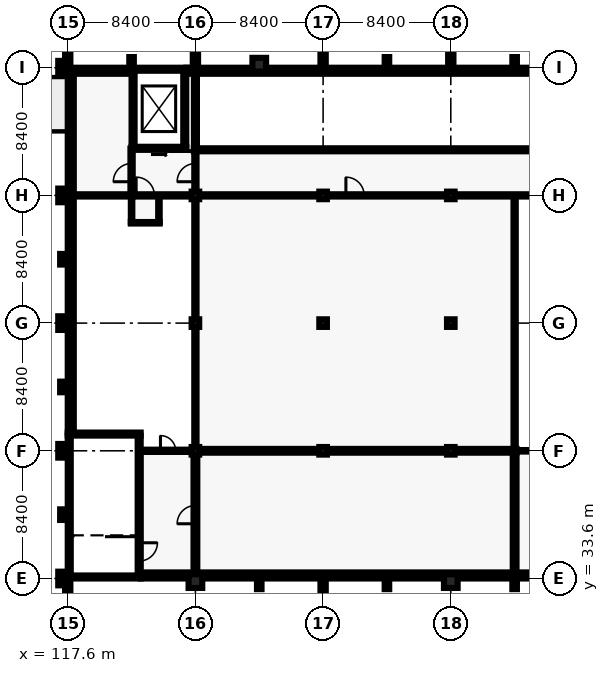
"""IFC4 building model, lengths in metres.
Left out: names, types, materials, properties, quantities, classifications, styles, units other than length and angle.
Written with IfcOpenShell. Run it as: python <this file> out.ifc"""

import sys

from ifc_helpers import new_model, si_unit, direction, frame, frame_2d, origin, origin_2d, place, context, subcontext, project, spatial, rectangle, extrude, element, fill, save


model = new_model("IFC4")
c1 = context("Model", 3, precision=1e-05, world=origin(), true_north=direction((0.0, 1.0)))
c2 = subcontext(c1, "Body", "Model", "MODEL_VIEW")
j1 = project(units=[si_unit("LENGTHUNIT", "METRE"), si_unit("PLANEANGLEUNIT", "RADIAN")], contexts=[c1])
p1 = place(None, origin())
s1 = spatial("IfcSite", under=j1, at=p1, CompositionType="ELEMENT")
p2 = place(p1, origin())
s2 = spatial("IfcBuilding", under=s1, at=p2, CompositionType="ELEMENT")
p3 = place(p2, frame((0.0, 0.0, 10.2)))
s3 = spatial("IfcBuildingStorey", under=s2, at=p3, CompositionType="ELEMENT", Elevation=10.2)
for number, where, z_axis, x_axis in (
    (1, (122.4, 33.7, 0.0), (0.0, 0.0, 1.0), (-1.0, 0.0, 0.0)),
    (2, (117.6, 43.1, 0.0), (0.0, 0.0, 1.0), (1.0, 0.0, 0.0)),
):
    element("IfcWall", number, at=place(p3, frame(where, z_axis=z_axis, x_axis=x_axis)), inside=s3, PredefinedType="SHEAR", context=c2, shape_type="SweptSolid", body=[
        extrude(rectangle(XDim=4.8, YDim=0.2, at=frame_2d((2.4, 0.0))), origin(), (0.0, 0.0, 1.0), 4.8),
    ])
p4 = place(p3, frame((117.7, 33.8, 0.0), z_axis=(0.0, 0.0, 1.0), x_axis=(0.0, 1.0, 0.0)))
e3 = element("IfcWall", 3, at=p4, inside=s3, PredefinedType="SHEAR", context=c2, shape_type="SweptSolid", body=[
    extrude(rectangle(XDim=9.2, YDim=0.2, at=frame_2d((4.6, 0.0))), origin(), (0.0, 0.0, 1.0), 4.8),
])
p5 = place(p3, frame((122.3, 43.0, 0.0), z_axis=(0.0, 0.0, 1.0), x_axis=(0.0, -1.0, 0.0)))
e4 = element("IfcWall", 4, at=p5, inside=s3, PredefinedType="SHEAR", context=c2, shape_type="SweptSolid", body=[
    extrude(rectangle(XDim=9.2, YDim=0.2, at=frame_2d((4.6, 0.0))), origin(), (0.0, 0.0, 1.0), 4.8),
])
p6 = place(p5, frame((7.05, 0.0, 0.0)))
e5 = element("IfcOpeningElement", 5, at=p6, cuts=e4, PredefinedType="OPENING", context=c2, shape_type="SweptSolid", body=[
    extrude(rectangle(XDim=1.2, YDim=2.1, at=frame_2d((0.6, 1.05))), frame((0.0, 0.11, 0.0), z_axis=(0.0, -1.0, 0.0), x_axis=(1.0, 0.0, 0.0)), (0.0, 0.0, 1.0), 0.22),
])
p7 = place(p3, frame((125.4, 61.9, 0.0), z_axis=(0.0, 0.0, 1.0), x_axis=(-1.0, 0.0, 0.0)))
e6 = element("IfcWall", 6, at=p7, inside=s3, PredefinedType="SHEAR", context=c2, shape_type="SweptSolid", body=[
    extrude(rectangle(XDim=3.6, YDim=0.2, at=frame_2d((1.8, 0.0))), origin(), (0.0, 0.0, 1.0), 4.8),
])
p8 = place(p7, frame((1.05, 0.0, 0.0)))
e7 = element("IfcOpeningElement", 7, at=p8, cuts=e6, PredefinedType="OPENING", context=c2, shape_type="SweptSolid", body=[
    extrude(rectangle(XDim=1.5, YDim=2.3, at=frame_2d((0.75, 1.15))), frame((0.0, 0.11, 0.0), z_axis=(0.0, -1.0, 0.0), x_axis=(1.0, 0.0, 0.0)), (0.0, 0.0, 1.0), 0.22),
])
p9 = place(p3, frame((121.8, 67.1, 0.0), z_axis=(0.0, 0.0, 1.0), x_axis=(1.0, 0.0, 0.0)))
e8 = element("IfcWall", 8, at=p9, inside=s3, PredefinedType="SHEAR", context=c2, shape_type="SweptSolid", body=[
    extrude(rectangle(XDim=3.6, YDim=0.2, at=frame_2d((1.8, 0.0))), origin(), (0.0, 0.0, 1.0), 4.8),
])
for number, where, z_axis, x_axis in (
    (9, (121.9, 62.0, 0.0), (0.0, 0.0, 1.0), (0.0, 1.0, 0.0)),
    (10, (125.3, 67.0, 0.0), (0.0, 0.0, 1.0), (0.0, -1.0, 0.0)),
):
    element("IfcWall", number, at=place(p3, frame(where, z_axis=z_axis, x_axis=x_axis)), inside=s3, PredefinedType="SHEAR", context=c2, shape_type="SweptSolid", body=[
        extrude(rectangle(XDim=5.0, YDim=0.2, at=frame_2d((2.5, 0.0))), origin(), (0.0, 0.0, 1.0), 4.8),
    ])
p10 = place(p3, frame((163.2, 33.8, 0.0), z_axis=(0.0, 0.0, 1.0), x_axis=(-1.0, 0.0, 0.0)))
e11 = element("IfcWall", 11, at=p10, inside=s3, PredefinedType="SHEAR", context=c2, shape_type="SweptSolid", body=[
    extrude(rectangle(XDim=40.8, YDim=0.4, at=frame_2d((20.4, 0.0))), origin(), (0.0, 0.0, 1.0), 4.8),
])
p11 = place(p3, frame((117.6, 67.0, 0.0), z_axis=(0.0, 0.0, 1.0), x_axis=(1.0, 0.0, 0.0)))
e12 = element("IfcWall", 12, at=p11, inside=s3, PredefinedType="SHEAR", context=c2, shape_type="SweptSolid", body=[
    extrude(rectangle(XDim=4.2, YDim=0.4, at=frame_2d((2.1, 0.0))), origin(), (0.0, 0.0, 1.0), 4.8),
])
p12 = place(p3, frame((125.4, 67.0, 0.0), z_axis=(0.0, 0.0, 1.0), x_axis=(1.0, 0.0, 0.0)))
e13 = element("IfcWall", 13, at=p12, inside=s3, PredefinedType="SHEAR", context=c2, shape_type="SweptSolid", body=[
    extrude(rectangle(XDim=37.8, YDim=0.4, at=frame_2d((18.9, 0.0))), origin(), (0.0, 0.0, 1.0), 4.8),
])
p13 = place(p3, frame((117.8, 43.2, 0.0), z_axis=(0.0, 0.0, 1.0), x_axis=(0.0, 1.0, 0.0)))
e14 = element("IfcWall", 14, at=p13, inside=s3, PredefinedType="SHEAR", context=c2, shape_type="SweptSolid", body=[
    extrude(rectangle(XDim=23.6, YDim=0.4, at=frame_2d((11.8, 0.0))), origin(), (0.0, 0.0, 1.0), 4.8),
])
for number, where, z_axis, x_axis in (
    (15, (126.0, 42.0, 0.0), (0.0, 0.0, 1.0), (1.0, 0.0, 0.0)),
    (16, (126.0, 50.4, 0.0), (0.0, 0.0, 1.0), (1.0, 0.0, 0.0)),
    (17, (126.0, 58.8, 0.0), (0.0, 0.0, 1.0), (1.0, 0.0, 0.0)),
    (18, (134.4, 42.0, 0.0), (0.0, 0.0, 1.0), (1.0, 0.0, 0.0)),
    (19, (134.4, 50.4, 0.0), (0.0, 0.0, 1.0), (1.0, 0.0, 0.0)),
    (20, (134.4, 58.8, 0.0), (0.0, 0.0, 1.0), (1.0, 0.0, 0.0)),
    (21, (142.8, 42.0, 0.0), (0.0, 0.0, 1.0), (1.0, 0.0, 0.0)),
    (22, (142.8, 50.4, 0.0), (0.0, 0.0, 1.0), (1.0, 0.0, 0.0)),
    (23, (142.8, 58.8, 0.0), (0.0, 0.0, 1.0), (1.0, 0.0, 0.0)),
):
    element("IfcColumn", number, at=place(p3, frame(where, z_axis=z_axis, x_axis=x_axis)), inside=s3, PredefinedType="COLUMN", context=c2, shape_type="SweptSolid", body=[
        extrude(rectangle(XDim=0.5, YDim=0.5, at=origin_2d()), origin(), (0.0, 0.0, 1.0), 4.8),
    ])
for number, where, z_axis, x_axis in (
    (24, (126.0, 33.427, 3.8), (0.0, 0.0, 1.0), (1.0, 0.0, 0.0)),
    (25, (142.8, 33.427, 3.8), (0.0, 0.0, 1.0), (1.0, 0.0, 0.0)),
    (26, (130.2, 67.4, 3.8), (0.0, 0.0, 1.0), (1.0, 0.0, 0.0)),
):
    element("IfcColumn", number, at=place(p3, frame(where, z_axis=z_axis, x_axis=x_axis)), inside=s3, PredefinedType="COLUMN", context=c2, shape_type="SweptSolid", body=[
        extrude(rectangle(XDim=0.9, YDim=0.9, at=origin_2d()), origin(), (0.0, 0.0, 1.0), 1.0),
    ])
p14 = place(p3, frame((117.6, 32.975, 0.0), z_axis=(0.0, 0.0, 1.0), x_axis=(1.0, 0.0, 0.0)))
e27 = element("IfcColumn", 27, at=p14, inside=s3, PredefinedType="PILASTER", context=c2, shape_type="SweptSolid", body=[
    extrude(rectangle(XDim=0.35, YDim=0.9, at=origin_2d()), origin(), (0.0, 0.0, 1.0), 4.8),
])
p15 = place(p3, frame((130.2, 33.25, 0.0), z_axis=(0.0, 0.0, 1.0), x_axis=(1.0, 0.0, 0.0)))
e28 = element("IfcColumn", 28, at=p15, inside=s3, PredefinedType="PILASTER", context=c2, shape_type="SweptSolid", body=[
    extrude(rectangle(XDim=0.3, YDim=0.7, at=origin_2d()), origin(), (0.0, 0.0, 1.0), 4.8),
])
p16 = place(p3, frame((134.4, 33.15, 0.0), z_axis=(0.0, 0.0, 1.0), x_axis=(1.0, 0.0, 0.0)))
e29 = element("IfcColumn", 29, at=p16, inside=s3, PredefinedType="PILASTER", context=c2, shape_type="SweptSolid", body=[
    extrude(rectangle(XDim=0.35, YDim=0.9, at=origin_2d()), origin(), (0.0, 0.0, 1.0), 4.8),
])
for number, where, z_axis, x_axis in (
    (30, (138.6, 33.25, 0.0), (0.0, 0.0, 1.0), (1.0, 0.0, 0.0)),
    (31, (147.0, 33.25, 0.0), (0.0, 0.0, 1.0), (1.0, 0.0, 0.0)),
):
    element("IfcColumn", number, at=place(p3, frame(where, z_axis=z_axis, x_axis=x_axis)), inside=s3, PredefinedType="PILASTER", context=c2, shape_type="SweptSolid", body=[
        extrude(rectangle(XDim=0.3, YDim=0.7, at=origin_2d()), origin(), (0.0, 0.0, 1.0), 4.8),
    ])
p17 = place(p3, frame((117.6, 67.825, 0.0), z_axis=(0.0, 0.0, 1.0), x_axis=(1.0, 0.0, 0.0)))
e32 = element("IfcColumn", 32, at=p17, inside=s3, PredefinedType="PILASTER", context=c2, shape_type="SweptSolid", body=[
    extrude(rectangle(XDim=0.35, YDim=0.9, at=origin_2d()), origin(), (0.0, 0.0, 1.0), 4.8),
])
p18 = place(p3, frame((121.8, 67.55, 0.0), z_axis=(0.0, 0.0, 1.0), x_axis=(1.0, 0.0, 0.0)))
e33 = element("IfcColumn", 33, at=p18, inside=s3, PredefinedType="PILASTER", context=c2, shape_type="SweptSolid", body=[
    extrude(rectangle(XDim=0.3, YDim=0.7, at=origin_2d()), origin(), (0.0, 0.0, 1.0), 4.8),
])
for number, where, z_axis, x_axis in (
    (34, (126.0, 67.65, 0.0), (0.0, 0.0, 1.0), (1.0, 0.0, 0.0)),
    (35, (134.4, 67.65, 0.0), (0.0, 0.0, 1.0), (1.0, 0.0, 0.0)),
):
    element("IfcColumn", number, at=place(p3, frame(where, z_axis=z_axis, x_axis=x_axis)), inside=s3, PredefinedType="PILASTER", context=c2, shape_type="SweptSolid", body=[
        extrude(rectangle(XDim=0.35, YDim=0.9, at=origin_2d()), origin(), (0.0, 0.0, 1.0), 4.8),
    ])
p19 = place(p3, frame((138.6, 67.55, 0.0), z_axis=(0.0, 0.0, 1.0), x_axis=(1.0, 0.0, 0.0)))
e36 = element("IfcColumn", 36, at=p19, inside=s3, PredefinedType="PILASTER", context=c2, shape_type="SweptSolid", body=[
    extrude(rectangle(XDim=0.3, YDim=0.7, at=origin_2d()), origin(), (0.0, 0.0, 1.0), 4.8),
])
p20 = place(p3, frame((142.8, 67.65, 0.0), z_axis=(0.0, 0.0, 1.0), x_axis=(1.0, 0.0, 0.0)))
e37 = element("IfcColumn", 37, at=p20, inside=s3, PredefinedType="PILASTER", context=c2, shape_type="SweptSolid", body=[
    extrude(rectangle(XDim=0.35, YDim=0.9, at=origin_2d()), origin(), (0.0, 0.0, 1.0), 4.8),
])
p21 = place(p3, frame((147.0, 67.55, 0.0), z_axis=(0.0, 0.0, 1.0), x_axis=(1.0, 0.0, 0.0)))
e38 = element("IfcColumn", 38, at=p21, inside=s3, PredefinedType="PILASTER", context=c2, shape_type="SweptSolid", body=[
    extrude(rectangle(XDim=0.3, YDim=0.7, at=origin_2d()), origin(), (0.0, 0.0, 1.0), 4.8),
])
p22 = place(p3, frame((117.15, 33.6, 0.0), z_axis=(0.0, 0.0, 1.0), x_axis=(0.0, 1.0, 0.0)))
e39 = element("IfcColumn", 39, at=p22, inside=s3, PredefinedType="PILASTER", context=c2, shape_type="SweptSolid", body=[
    extrude(rectangle(XDim=0.35, YDim=0.9, at=origin_2d()), origin(), (0.0, 0.0, 1.0), 4.8),
])
p23 = place(p3, frame((117.25, 37.8, 0.0), z_axis=(0.0, 0.0, 1.0), x_axis=(0.0, 1.0, 0.0)))
e40 = element("IfcColumn", 40, at=p23, inside=s3, PredefinedType="PILASTER", context=c2, shape_type="SweptSolid", body=[
    extrude(rectangle(XDim=0.3, YDim=0.7, at=origin_2d()), origin(), (0.0, 0.0, 1.0), 4.8),
])
p24 = place(p3, frame((117.15, 42.0, 0.0), z_axis=(0.0, 0.0, 1.0), x_axis=(0.0, 1.0, 0.0)))
e41 = element("IfcColumn", 41, at=p24, inside=s3, PredefinedType="PILASTER", context=c2, shape_type="SweptSolid", body=[
    extrude(rectangle(XDim=0.35, YDim=0.9, at=origin_2d()), origin(), (0.0, 0.0, 1.0), 4.8),
])
p25 = place(p3, frame((117.25, 46.2, 0.0), z_axis=(0.0, 0.0, 1.0), x_axis=(0.0, 1.0, 0.0)))
e42 = element("IfcColumn", 42, at=p25, inside=s3, PredefinedType="PILASTER", context=c2, shape_type="SweptSolid", body=[
    extrude(rectangle(XDim=0.3, YDim=0.7, at=origin_2d()), origin(), (0.0, 0.0, 1.0), 4.8),
])
p26 = place(p3, frame((117.15, 50.4, 0.0), z_axis=(0.0, 0.0, 1.0), x_axis=(0.0, 1.0, 0.0)))
e43 = element("IfcColumn", 43, at=p26, inside=s3, PredefinedType="PILASTER", context=c2, shape_type="SweptSolid", body=[
    extrude(rectangle(XDim=0.35, YDim=0.9, at=origin_2d()), origin(), (0.0, 0.0, 1.0), 4.8),
])
p27 = place(p3, frame((117.25, 54.6, 0.0), z_axis=(0.0, 0.0, 1.0), x_axis=(0.0, 1.0, 0.0)))
e44 = element("IfcColumn", 44, at=p27, inside=s3, PredefinedType="PILASTER", context=c2, shape_type="SweptSolid", body=[
    extrude(rectangle(XDim=0.3, YDim=0.7, at=origin_2d()), origin(), (0.0, 0.0, 1.0), 4.8),
])
for number, where, z_axis, x_axis in (
    (45, (117.15, 58.8, 0.0), (0.0, 0.0, 1.0), (0.0, 1.0, 0.0)),
    (46, (117.15, 67.2, 0.0), (0.0, 0.0, 1.0), (0.0, 1.0, 0.0)),
):
    element("IfcColumn", number, at=place(p3, frame(where, z_axis=z_axis, x_axis=x_axis)), inside=s3, PredefinedType="PILASTER", context=c2, shape_type="SweptSolid", body=[
        extrude(rectangle(XDim=0.35, YDim=0.9, at=origin_2d()), origin(), (0.0, 0.0, 1.0), 4.8),
    ])
p28 = place(p3, frame((125.875, 42.0, 0.0), z_axis=(0.0, 0.0, 1.0), x_axis=(1.0, 0.0, 0.0)))
e47 = element("IfcWall", 47, at=p28, inside=s3, PredefinedType="PARTITIONING", context=c2, shape_type="SweptSolid", body=[
    extrude(rectangle(XDim=21.25, YDim=0.25, at=frame_2d((10.625, 0.0))), origin(), (0.0, 0.0, 1.0), 4.5),
])
p29 = place(p3, frame((126.0, 34.0, 0.0), z_axis=(0.0, 0.0, 1.0), x_axis=(0.0, 1.0, 0.0)))
e48 = element("IfcWall", 48, at=p29, inside=s3, PredefinedType="PARTITIONING", context=c2, shape_type="SweptSolid", body=[
    extrude(rectangle(XDim=7.875, YDim=0.25, at=frame_2d((3.938, 0.0))), origin(), (0.0, 0.0, 1.0), 4.5),
])
p30 = place(p29, frame((3.2, 0.0, 0.0)))
e49 = element("IfcOpeningElement", 49, at=p30, cuts=e48, PredefinedType="OPENING", context=c2, shape_type="SweptSolid", body=[
    extrude(rectangle(XDim=1.2, YDim=2.1, at=frame_2d((0.6, 1.05))), frame((0.0, 0.135, 0.0), z_axis=(0.0, -1.0, 0.0), x_axis=(1.0, 0.0, 0.0)), (0.0, 0.0, 1.0), 0.27),
])
p31 = place(p3, frame((147.0, 34.0, 0.0), z_axis=(0.0, 0.0, 1.0), x_axis=(0.0, 1.0, 0.0)))
e50 = element("IfcWall", 50, at=p31, inside=s3, PredefinedType="PARTITIONING", context=c2, shape_type="SweptSolid", body=[
    extrude(rectangle(XDim=7.875, YDim=0.25, at=frame_2d((3.938, 0.0))), origin(), (0.0, 0.0, 1.0), 4.5),
])
p32 = place(p3, frame((125.9, 61.8, 0.0), z_axis=(0.0, 0.0, 1.0), x_axis=(1.0, 0.0, 0.0)))
e51 = element("IfcWall", 51, at=p32, inside=s3, PredefinedType="SOLIDWALL", context=c2, shape_type="SweptSolid", body=[
    extrude(rectangle(XDim=34.4, YDim=0.2, at=frame_2d((17.2, 0.0))), origin(), (0.0, 0.0, 1.0), 4.5),
])
p33 = place(p3, frame((126.0, 61.9, 0.0), z_axis=(0.0, 0.0, 1.0), x_axis=(0.0, 1.0, 0.0)))
e52 = element("IfcWall", 52, at=p33, inside=s3, PredefinedType="SHEAR", context=c2, shape_type="SweptSolid", body=[
    extrude(rectangle(XDim=4.9, YDim=0.2, at=frame_2d((2.45, 0.0))), origin(), (0.0, 0.0, 1.0), 4.5),
])
p34 = place(p3, frame((122.4, 42.0, 0.0), z_axis=(0.0, 0.0, 1.0), x_axis=(1.0, 0.0, 0.0)))
e53 = element("IfcWall", 53, at=p34, inside=s3, PredefinedType="PARTITIONING", context=c2, shape_type="SweptSolid", body=[
    extrude(rectangle(XDim=3.475, YDim=0.15, at=frame_2d((1.738, 0.0))), origin(), (0.0, 0.0, 1.0), 4.5),
])
p35 = place(p34, frame((1.3, 0.0, 0.0)))
e54 = element("IfcOpeningElement", 54, at=p35, cuts=e53, PredefinedType="OPENING", context=c2, shape_type="SweptSolid", body=[
    extrude(rectangle(XDim=1.0, YDim=2.1, at=frame_2d((0.5, 1.05))), frame((0.0, 0.085, 0.0), z_axis=(0.0, -1.0, 0.0), x_axis=(1.0, 0.0, 0.0)), (0.0, 0.0, 1.0), 0.17),
])
p36 = place(p3, frame((118.0, 58.8, 0.0), z_axis=(0.0, 0.0, 1.0), x_axis=(1.0, 0.0, 0.0)))
e55 = element("IfcWall", 55, at=p36, inside=s3, PredefinedType="PARTITIONING", context=c2, shape_type="SweptSolid", body=[
    extrude(rectangle(XDim=3.875, YDim=0.15, at=frame_2d((1.938, 0.0))), origin(), (0.0, 0.0, 1.0), 4.5),
])
p37 = place(p3, frame((125.925, 58.8, 0.0), z_axis=(0.0, 0.0, 1.0), x_axis=(1.0, 0.0, 0.0)))
e56 = element("IfcWall", 56, at=p37, inside=s3, PredefinedType="PARTITIONING", context=c2, shape_type="SweptSolid", body=[
    extrude(rectangle(XDim=34.35, YDim=0.15, at=frame_2d((17.175, 0.0))), origin(), (0.0, 0.0, 1.0), 4.5),
])
p38 = place(p37, frame((9.975, 0.0, 0.0)))
e57 = element("IfcOpeningElement", 57, at=p38, cuts=e56, PredefinedType="OPENING", context=c2, shape_type="SweptSolid", body=[
    extrude(rectangle(XDim=1.2, YDim=2.1, at=frame_2d((0.6, 1.05))), frame((0.0, 0.085, 0.0), z_axis=(0.0, -1.0, 0.0), x_axis=(1.0, 0.0, 0.0)), (0.0, 0.0, 1.0), 0.17),
])
p39 = place(p3, frame((121.875, 58.8, 0.0), z_axis=(0.0, 0.0, 1.0), x_axis=(1.0, 0.0, 0.0)))
e58 = element("IfcWall", 58, at=p39, inside=s3, PredefinedType="SOLIDWALL", context=c2, shape_type="SweptSolid", body=[
    extrude(rectangle(XDim=4.05, YDim=0.15, at=frame_2d((2.025, 0.0))), origin(), (0.0, 0.0, 1.0), 4.5),
])
p40 = place(p39, frame((0.225, 0.0, 0.0)))
e59 = element("IfcOpeningElement", 59, at=p40, cuts=e58, PredefinedType="OPENING", context=c2, shape_type="SweptSolid", body=[
    extrude(rectangle(XDim=1.2, YDim=2.1, at=frame_2d((0.6, 1.05))), frame((0.0, 0.085, 0.0), z_axis=(0.0, -1.0, 0.0), x_axis=(1.0, 0.0, 0.0)), (0.0, 0.0, 1.0), 0.17),
])
for number, where, z_axis, x_axis in (
    (60, (126.0, 42.125, 0.0), (0.0, 0.0, 1.0), (0.0, 1.0, 0.0)),
    (61, (147.0, 42.125, 0.0), (0.0, 0.0, 1.0), (0.0, 1.0, 0.0)),
):
    element("IfcWall", number, at=place(p3, frame(where, z_axis=z_axis, x_axis=x_axis)), inside=s3, PredefinedType="PARTITIONING", context=c2, shape_type="SweptSolid", body=[
        extrude(rectangle(XDim=16.6, YDim=0.15, at=frame_2d((8.3, 0.0))), origin(), (0.0, 0.0, 1.0), 4.5),
    ])
p41 = place(p3, frame((121.8, 58.875, 0.0), z_axis=(0.0, 0.0, 1.0), x_axis=(0.0, 1.0, 0.0)))
e62 = element("IfcWall", 62, at=p41, inside=s3, PredefinedType="SOLIDWALL", context=c2, shape_type="SweptSolid", body=[
    extrude(rectangle(XDim=3.0, YDim=0.15, at=frame_2d((1.5, 0.0))), origin(), (0.0, 0.0, 1.0), 4.5),
])
p42 = place(p41, frame((0.825, 0.0, 0.0)))
e63 = element("IfcOpeningElement", 63, at=p42, cuts=e62, PredefinedType="OPENING", context=c2, shape_type="SweptSolid", body=[
    extrude(rectangle(XDim=1.2, YDim=2.1, at=frame_2d((0.6, 1.05))), frame((0.0, 0.085, 0.0), z_axis=(0.0, -1.0, 0.0), x_axis=(1.0, 0.0, 0.0)), (0.0, 0.0, 1.0), 0.17),
])
p43 = place(p3, frame((126.0, 58.875, 0.0), z_axis=(0.0, 0.0, 1.0), x_axis=(0.0, 1.0, 0.0)))
e64 = element("IfcWall", 64, at=p43, inside=s3, PredefinedType="SOLIDWALL", context=c2, shape_type="SweptSolid", body=[
    extrude(rectangle(XDim=2.825, YDim=0.15, at=frame_2d((1.413, 0.0))), origin(), (0.0, 0.0, 1.0), 4.5),
])
p44 = place(p43, frame((0.825, 0.0, 0.0)))
e65 = element("IfcOpeningElement", 65, at=p44, cuts=e64, PredefinedType="OPENING", context=c2, shape_type="SweptSolid", body=[
    extrude(rectangle(XDim=1.2, YDim=2.1, at=frame_2d((0.6, 1.05))), frame((0.0, 0.085, 0.0), z_axis=(0.0, -1.0, 0.0), x_axis=(1.0, 0.0, 0.0)), (0.0, 0.0, 1.0), 0.17),
])
p45 = place(p3, frame((147.125, 42.0, 0.0), z_axis=(0.0, 0.0, 1.0), x_axis=(1.0, 0.0, 0.0)))
e66 = element("IfcWall", 66, at=p45, inside=s3, PredefinedType="PARTITIONING", context=c2, shape_type="SweptSolid", body=[
    extrude(rectangle(XDim=13.0, YDim=0.1, at=frame_2d((6.5, 0.0))), origin(), (0.0, 0.0, 1.0), 4.5),
])
p46 = place(p45, frame((5.975, 0.0, 0.0)))
e67 = element("IfcOpeningElement", 67, at=p46, cuts=e66, PredefinedType="OPENING", context=c2, shape_type="SweptSolid", body=[
    extrude(rectangle(XDim=1.0, YDim=2.1, at=frame_2d((0.5, 1.05))), frame((0.0, 0.06, 0.0), z_axis=(0.0, -1.0, 0.0), x_axis=(1.0, 0.0, 0.0)), (0.0, 0.0, 1.0), 0.12),
])
p47 = place(p3, frame((121.75, 57.0, 0.0), z_axis=(0.0, 0.0, 1.0), x_axis=(1.0, 0.0, 0.0)))
e68 = element("IfcWall", 68, at=p47, inside=s3, PredefinedType="PARTITIONING", context=c2, shape_type="SweptSolid", body=[
    extrude(rectangle(XDim=1.9, YDim=0.1, at=frame_2d((0.95, 0.0))), origin(), (0.0, 0.0, 1.0), 4.5),
])
for number, where, z_axis, x_axis in (
    (69, (121.8, 57.05, 0.0), (0.0, 0.0, 1.0), (0.0, 1.0, 0.0)),
    (70, (123.6, 57.05, 0.0), (0.0, 0.0, 1.0), (0.0, 1.0, 0.0)),
):
    element("IfcWall", number, at=place(p3, frame(where, z_axis=z_axis, x_axis=x_axis)), inside=s3, PredefinedType="PARTITIONING", context=c2, shape_type="SweptSolid", body=[
        extrude(rectangle(XDim=1.675, YDim=0.1, at=frame_2d((0.837, 0.0))), origin(), (0.0, 0.0, 1.0), 4.5),
    ])
p48 = place(p8, origin())
e71 = element("IfcDoor", 71, at=p48, inside=s3, OperationType="SLIDING_TO_LEFT", PredefinedType="DOOR", context=c2, shape_type="SweptSolid", body=[
    extrude(rectangle(XDim=1.5, YDim=2.3, at=frame_2d((0.75, 1.15))), frame((0.0, 0.025, 0.0), z_axis=(0.0, -1.0, 0.0), x_axis=(1.0, 0.0, 0.0)), (0.0, 0.0, 1.0), 0.05),
])
fill(e7, e71)
p49 = place(p6, origin())
e72 = element("IfcDoor", 72, at=p49, inside=s3, OperationType="SINGLE_SWING_LEFT", PredefinedType="DOOR", context=c2, shape_type="SweptSolid", body=[
    extrude(rectangle(XDim=1.2, YDim=2.1, at=frame_2d((0.6, 1.05))), frame((0.0, 0.025, 0.0), z_axis=(0.0, -1.0, 0.0), x_axis=(1.0, 0.0, 0.0)), (0.0, 0.0, 1.0), 0.05),
])
fill(e5, e72)
p50 = place(p30, origin())
e73 = element("IfcDoor", 73, at=p50, inside=s3, OperationType="SINGLE_SWING_LEFT", PredefinedType="DOOR", context=c2, shape_type="SweptSolid", body=[
    extrude(rectangle(XDim=1.2, YDim=2.1, at=frame_2d((0.6, 1.05))), frame((0.0, 0.025, 0.0), z_axis=(0.0, -1.0, 0.0), x_axis=(1.0, 0.0, 0.0)), (0.0, 0.0, 1.0), 0.05),
])
fill(e49, e73)
p51 = place(p35, origin())
e74 = element("IfcDoor", 74, at=p51, inside=s3, OperationType="SINGLE_SWING_RIGHT", PredefinedType="DOOR", context=c2, shape_type="SweptSolid", body=[
    extrude(rectangle(XDim=1.0, YDim=2.1, at=frame_2d((0.5, 1.05))), frame((0.0, 0.025, 0.0), z_axis=(0.0, -1.0, 0.0), x_axis=(1.0, 0.0, 0.0)), (0.0, 0.0, 1.0), 0.05),
])
fill(e54, e74)
p52 = place(p38, origin())
e75 = element("IfcDoor", 75, at=p52, inside=s3, OperationType="SINGLE_SWING_RIGHT", PredefinedType="DOOR", context=c2, shape_type="SweptSolid", body=[
    extrude(rectangle(XDim=1.2, YDim=2.1, at=frame_2d((0.6, 1.05))), frame((0.0, 0.025, 0.0), z_axis=(0.0, -1.0, 0.0), x_axis=(1.0, 0.0, 0.0)), (0.0, 0.0, 1.0), 0.05),
])
fill(e57, e75)
p53 = place(p44, origin())
e76 = element("IfcDoor", 76, at=p53, inside=s3, OperationType="SINGLE_SWING_RIGHT", PredefinedType="DOOR", context=c2, shape_type="SweptSolid", body=[
    extrude(rectangle(XDim=1.2, YDim=2.1, at=frame_2d((0.6, 1.05))), frame((0.0, 0.025, 0.0), z_axis=(0.0, -1.0, 0.0), x_axis=(1.0, 0.0, 0.0)), (0.0, 0.0, 1.0), 0.05),
])
fill(e65, e76)
p54 = place(p40, origin())
e77 = element("IfcDoor", 77, at=p54, inside=s3, OperationType="SINGLE_SWING_LEFT", PredefinedType="DOOR", context=c2, shape_type="SweptSolid", body=[
    extrude(rectangle(XDim=1.2, YDim=2.1, at=frame_2d((0.6, 1.05))), frame((0.0, 0.025, 0.0), z_axis=(0.0, -1.0, 0.0), x_axis=(1.0, 0.0, 0.0)), (0.0, 0.0, 1.0), 0.05),
])
fill(e59, e77)
p55 = place(p42, origin())
e78 = element("IfcDoor", 78, at=p55, inside=s3, OperationType="SINGLE_SWING_RIGHT", PredefinedType="DOOR", context=c2, shape_type="SweptSolid", body=[
    extrude(rectangle(XDim=1.2, YDim=2.1, at=frame_2d((0.6, 1.05))), frame((0.0, 0.025, 0.0), z_axis=(0.0, -1.0, 0.0), x_axis=(1.0, 0.0, 0.0)), (0.0, 0.0, 1.0), 0.05),
])
fill(e63, e78)
save(model, sys.argv[1])
